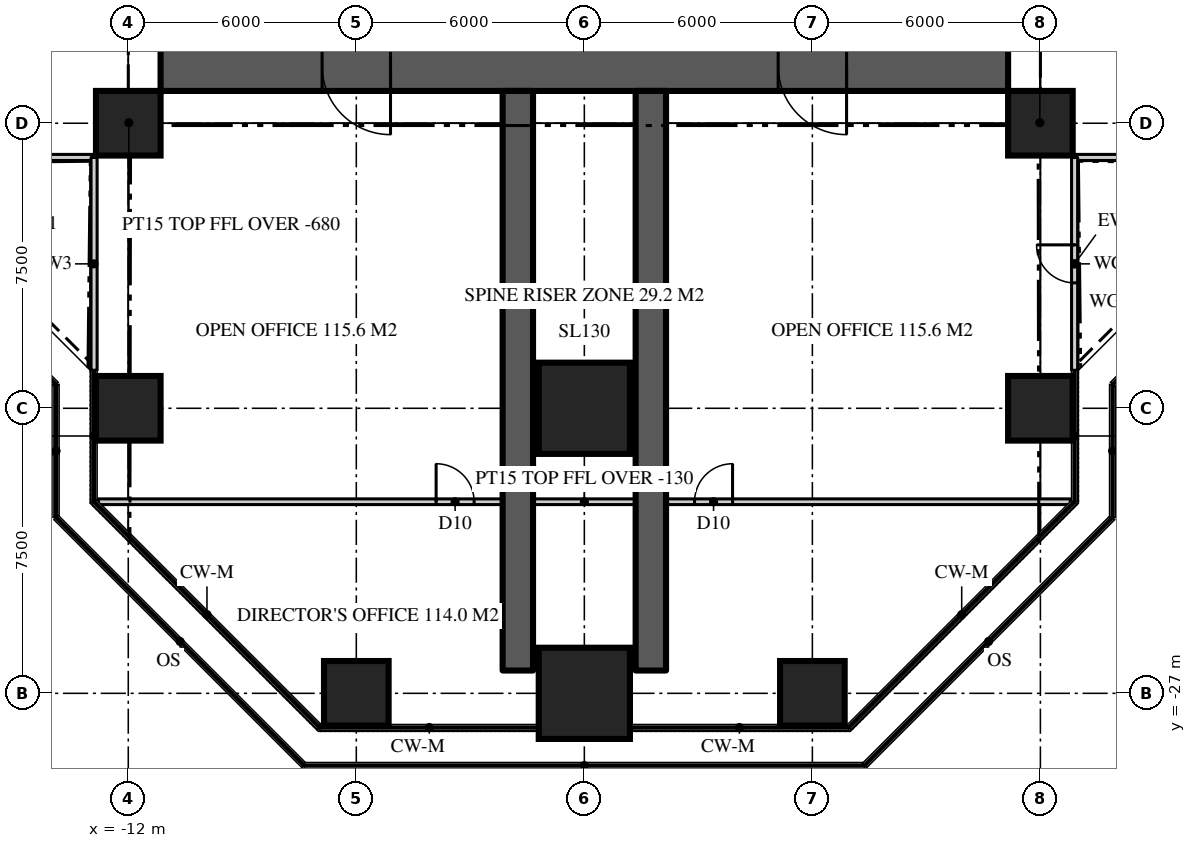
"""IFC4 building model, lengths in metres.
Left out: names, types, materials, properties, quantities, classifications, styles, units other than length and angle.
Written with IfcOpenShell. Run it as: python <this file> out.ifc"""

import sys

from ifc_helpers import new_model, si_unit, direction, frame, frame_2d, origin, origin_2d, place, context, subcontext, project, spatial, rectangle, extrude, element, fill, save


model = new_model("IFC4")
c1 = context("Model", 3, precision=1e-05, world=origin(), true_north=direction((0.0, 1.0)))
c2 = subcontext(c1, "Body", "Model", "MODEL_VIEW")
j1 = project(units=[si_unit("LENGTHUNIT", "METRE"), si_unit("PLANEANGLEUNIT", "RADIAN")], contexts=[c1])
p1 = place(None, origin())
s1 = spatial("IfcSite", under=j1, at=p1, CompositionType="ELEMENT")
p2 = place(p1, origin())
s2 = spatial("IfcBuilding", under=s1, at=p2, CompositionType="ELEMENT")
p3 = place(p2, frame((0.0, 0.0, 171.0)))
s3 = spatial("IfcBuildingStorey", under=s2, at=p3, CompositionType="ELEMENT", Elevation=171.0)
p4 = place(p3, frame((11.15, -10.5, 0.0), z_axis=(0.0, 0.0, 1.0), x_axis=(-1.0, 0.0, 0.0)))
e1 = element("IfcWall", 1, at=p4, inside=s3, PredefinedType="SHEAR", context=c2, shape_type="SweptSolid", body=[
    extrude(rectangle(XDim=22.3, YDim=1.3, at=frame_2d((11.15, 0.0))), origin(), (0.0, 0.0, 1.0), 3.9),
])
p5 = place(p4, frame((16.25, 0.0, 0.0)))
e2 = element("IfcOpeningElement", 2, at=p5, cuts=e1, PredefinedType="OPENING", context=c2, shape_type="SweptSolid", body=[
    extrude(rectangle(XDim=1.8, YDim=2.2, at=frame_2d((0.9, 1.1))), frame((0.0, 0.66, 0.0), z_axis=(0.0, -1.0, 0.0), x_axis=(1.0, 0.0, 0.0)), (0.0, 0.0, 1.0), 1.32),
])
p6 = place(p4, frame((4.25, 0.0, 0.0)))
e3 = element("IfcOpeningElement", 3, at=p6, cuts=e1, PredefinedType="OPENING", context=c2, shape_type="SweptSolid", body=[
    extrude(rectangle(XDim=1.8, YDim=2.2, at=frame_2d((0.9, 1.1))), frame((0.0, 0.66, 0.0), z_axis=(0.0, -1.0, 0.0), x_axis=(1.0, 0.0, 0.0)), (0.0, 0.0, 1.0), 1.32),
])
for number, where, z_axis, x_axis in (
    (4, (-1.75, -11.15, 0.0), (0.0, 0.0, 1.0), (0.0, -1.0, 0.0)),
    (5, (1.75, -11.15, 0.0), (0.0, 0.0, 1.0), (0.0, -1.0, 0.0)),
):
    element("IfcWall", number, at=place(p3, frame(where, z_axis=z_axis, x_axis=x_axis)), inside=s3, PredefinedType="SHEAR", context=c2, shape_type="SweptSolid", body=[
        extrude(rectangle(XDim=15.25, YDim=0.8, at=frame_2d((7.625, 0.0))), origin(), (0.0, 0.0, 1.0), 3.9),
    ])
p7 = place(p3, frame((-6.0, -27.0, 0.0), z_axis=(0.0, 0.0, 1.0), x_axis=(1.0, 0.0, 0.0)))
e6 = element("IfcColumn", 6, at=p7, inside=s3, PredefinedType="COLUMN", context=c2, shape_type="SweptSolid", body=[
    extrude(rectangle(XDim=1.7, YDim=1.7, at=origin_2d()), origin(), (0.0, 0.0, 1.0), 3.9),
])
p8 = place(p3, frame((0.0, -27.0, 0.0), z_axis=(0.0, 0.0, 1.0), x_axis=(1.0, 0.0, 0.0)))
e7 = element("IfcColumn", 7, at=p8, inside=s3, PredefinedType="COLUMN", context=c2, shape_type="SweptSolid", body=[
    extrude(rectangle(XDim=2.4, YDim=2.4, at=origin_2d()), origin(), (0.0, 0.0, 1.0), 3.9),
])
for number, where, z_axis, x_axis in (
    (8, (6.0, -27.0, 0.0), (0.0, 0.0, 1.0), (1.0, 0.0, 0.0)),
    (9, (-12.0, -19.5, 0.0), (0.0, 0.0, 1.0), (1.0, 0.0, 0.0)),
):
    element("IfcColumn", number, at=place(p3, frame(where, z_axis=z_axis, x_axis=x_axis)), inside=s3, PredefinedType="COLUMN", context=c2, shape_type="SweptSolid", body=[
        extrude(rectangle(XDim=1.7, YDim=1.7, at=origin_2d()), origin(), (0.0, 0.0, 1.0), 3.9),
    ])
p9 = place(p3, frame((0.0, -19.5, 0.0), z_axis=(0.0, 0.0, 1.0), x_axis=(1.0, 0.0, 0.0)))
e10 = element("IfcColumn", 10, at=p9, inside=s3, PredefinedType="COLUMN", context=c2, shape_type="SweptSolid", body=[
    extrude(rectangle(XDim=2.4, YDim=2.4, at=origin_2d()), origin(), (0.0, 0.0, 1.0), 3.9),
])
for number, where, z_axis, x_axis in (
    (11, (12.0, -19.5, 0.0), (0.0, 0.0, 1.0), (1.0, 0.0, 0.0)),
    (12, (-12.0, -12.0, 0.0), (0.0, 0.0, 1.0), (1.0, 0.0, 0.0)),
    (13, (12.0, -12.0, 0.0), (0.0, 0.0, 1.0), (1.0, 0.0, 0.0)),
):
    element("IfcColumn", number, at=place(p3, frame(where, z_axis=z_axis, x_axis=x_axis)), inside=s3, PredefinedType="COLUMN", context=c2, shape_type="SweptSolid", body=[
        extrude(rectangle(XDim=1.7, YDim=1.7, at=origin_2d()), origin(), (0.0, 0.0, 1.0), 3.9),
    ])
p10 = place(p3, frame((12.9, -12.9, 0.0), z_axis=(0.0, 0.0, 1.0), x_axis=(1.0, 0.0, 0.0)))
e14 = element("IfcWall", 14, at=p10, inside=s3, PredefinedType="SOLIDWALL", context=c2, shape_type="SweptSolid", body=[
    extrude(rectangle(XDim=5.6, YDim=0.16, at=frame_2d((2.8, 0.0))), origin(), (0.0, 0.0, 1.0), 3.77),
])
p11 = place(p3, frame((-18.5, -12.9, 0.0), z_axis=(0.0, 0.0, 1.0), x_axis=(1.0, 0.0, 0.0)))
e15 = element("IfcWall", 15, at=p11, inside=s3, PredefinedType="SOLIDWALL", context=c2, shape_type="SweptSolid", body=[
    extrude(rectangle(XDim=5.6, YDim=0.16, at=frame_2d((2.8, 0.0))), origin(), (0.0, 0.0, 1.0), 3.77),
])
p12 = place(p11, frame((2.3, 0.0, 0.0)))
e16 = element("IfcOpeningElement", 16, at=p12, cuts=e15, PredefinedType="OPENING", context=c2, shape_type="SweptSolid", body=[
    extrude(rectangle(XDim=1.0, YDim=2.2, at=frame_2d((0.5, 1.1))), frame((0.0, 0.09, 0.0), z_axis=(0.0, -1.0, 0.0), x_axis=(1.0, 0.0, 0.0)), (0.0, 0.0, 1.0), 0.18),
])
p13 = place(p3, frame((-12.9, -12.9, 0.0), z_axis=(0.0, 0.0, 1.0), x_axis=(0.0, -1.0, 0.0)))
e17 = element("IfcWall", 17, at=p13, inside=s3, PredefinedType="SOLIDWALL", context=c2, shape_type="SweptSolid", body=[
    extrude(rectangle(XDim=5.6, YDim=0.16, at=frame_2d((2.8, 0.0))), origin(), (0.0, 0.0, 1.0), 3.77),
])
p14 = place(p3, frame((12.9, -18.5, 0.0), z_axis=(0.0, 0.0, 1.0), x_axis=(0.0, 1.0, 0.0)))
e18 = element("IfcWall", 18, at=p14, inside=s3, PredefinedType="SOLIDWALL", context=c2, shape_type="SweptSolid", body=[
    extrude(rectangle(XDim=5.6, YDim=0.16, at=frame_2d((2.8, 0.0))), origin(), (0.0, 0.0, 1.0), 3.77),
])
p15 = place(p14, frame((2.3, 0.0, 0.0)))
e19 = element("IfcOpeningElement", 19, at=p15, cuts=e18, PredefinedType="OPENING", context=c2, shape_type="SweptSolid", body=[
    extrude(rectangle(XDim=1.0, YDim=2.2, at=frame_2d((0.5, 1.1))), frame((0.0, 0.09, 0.0), z_axis=(0.0, -1.0, 0.0), x_axis=(1.0, 0.0, 0.0)), (0.0, 0.0, 1.0), 0.18),
])
p16 = place(p3, frame((-12.786, -21.959, 0.0), z_axis=(0.0, 0.0, 1.0), x_axis=(1.0, 0.0, 0.0)))
e20 = element("IfcWall", 20, at=p16, inside=s3, PredefinedType="PARTITIONING", context=c2, shape_type="SweptSolid", body=[
    extrude(rectangle(XDim=25.573, YDim=0.15, at=frame_2d((12.786, 0.0))), origin(), (0.0, 0.0, 1.0), 3.77),
])
p17 = place(p16, frame((15.687, 0.0, 0.0)))
e21 = element("IfcOpeningElement", 21, at=p17, cuts=e20, PredefinedType="OPENING", context=c2, shape_type="SweptSolid", body=[
    extrude(rectangle(XDim=1.0, YDim=2.2, at=frame_2d((0.5, 1.1))), frame((0.0, 0.085, 0.0), z_axis=(0.0, -1.0, 0.0), x_axis=(1.0, 0.0, 0.0)), (0.0, 0.0, 1.0), 0.17),
])
p18 = place(p16, frame((8.886, 0.0, 0.0)))
e22 = element("IfcOpeningElement", 22, at=p18, cuts=e20, PredefinedType="OPENING", context=c2, shape_type="SweptSolid", body=[
    extrude(rectangle(XDim=1.0, YDim=2.2, at=frame_2d((0.5, 1.1))), frame((0.0, 0.085, 0.0), z_axis=(0.0, -1.0, 0.0), x_axis=(1.0, 0.0, 0.0)), (0.0, 0.0, 1.0), 0.17),
])
for number, where, z_axis, x_axis in (
    (23, (-11.15, -11.15, 0.0), (0.0, 0.0, 1.0), (-0.707, -0.707, 0.0)),
    (24, (11.15, -11.15, 0.0), (0.0, 0.0, 1.0), (0.707, -0.707, 0.0)),
):
    element("IfcWall", number, at=place(p3, frame(where, z_axis=z_axis, x_axis=x_axis)), inside=s3, PredefinedType="PARTITIONING", context=c2, shape_type="SweptSolid", body=[
        extrude(rectangle(XDim=2.362, YDim=0.15, at=frame_2d((1.181, 0.0))), origin(), (0.0, 0.0, 1.0), 3.22),
    ])
p19 = place(p15, origin())
e25 = element("IfcDoor", 25, at=p19, inside=s3, OperationType="SINGLE_SWING_RIGHT", PredefinedType="DOOR", context=c2, shape_type="SweptSolid", body=[
    extrude(rectangle(XDim=1.0, YDim=2.2, at=frame_2d((0.5, 1.1))), frame((0.0, 0.025, 0.0), z_axis=(0.0, -1.0, 0.0), x_axis=(1.0, 0.0, 0.0)), (0.0, 0.0, 1.0), 0.05),
])
fill(e19, e25)
p20 = place(p5, origin())
e26 = element("IfcDoor", 26, at=p20, inside=s3, OperationType="DOUBLE_DOOR_DOUBLE_SWING", PredefinedType="DOOR", context=c2, shape_type="SweptSolid", body=[
    extrude(rectangle(XDim=1.8, YDim=2.2, at=frame_2d((0.9, 1.1))), frame((0.0, 0.025, 0.0), z_axis=(0.0, -1.0, 0.0), x_axis=(1.0, 0.0, 0.0)), (0.0, 0.0, 1.0), 0.05),
])
fill(e2, e26)
p21 = place(p6, origin())
e27 = element("IfcDoor", 27, at=p21, inside=s3, OperationType="DOUBLE_DOOR_DOUBLE_SWING", PredefinedType="DOOR", context=c2, shape_type="SweptSolid", body=[
    extrude(rectangle(XDim=1.8, YDim=2.2, at=frame_2d((0.9, 1.1))), frame((0.0, 0.025, 0.0), z_axis=(0.0, -1.0, 0.0), x_axis=(1.0, 0.0, 0.0)), (0.0, 0.0, 1.0), 0.05),
])
fill(e3, e27)
p22 = place(p17, origin())
e28 = element("IfcDoor", 28, at=p22, inside=s3, OperationType="SINGLE_SWING_RIGHT", PredefinedType="DOOR", context=c2, shape_type="SweptSolid", body=[
    extrude(rectangle(XDim=1.0, YDim=2.2, at=frame_2d((0.5, 1.1))), frame((0.0, 0.025, 0.0), z_axis=(0.0, -1.0, 0.0), x_axis=(1.0, 0.0, 0.0)), (0.0, 0.0, 1.0), 0.05),
])
fill(e21, e28)
p23 = place(p18, origin())
e29 = element("IfcDoor", 29, at=p23, inside=s3, OperationType="SINGLE_SWING_LEFT", PredefinedType="DOOR", context=c2, shape_type="SweptSolid", body=[
    extrude(rectangle(XDim=1.0, YDim=2.2, at=frame_2d((0.5, 1.1))), frame((0.0, 0.025, 0.0), z_axis=(0.0, -1.0, 0.0), x_axis=(1.0, 0.0, 0.0)), (0.0, 0.0, 1.0), 0.05),
])
fill(e22, e29)
save(model, sys.argv[1])
